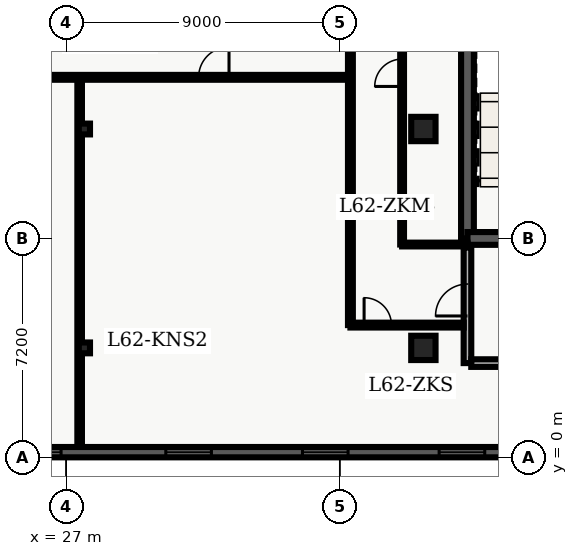
"""IFC4 building model, lengths in metres.
Left out: names, types, materials, properties, quantities, classifications, styles, units other than length and angle.
Written with IfcOpenShell. Run it as: python <this file> out.ifc"""

import sys

from ifc_helpers import new_model, entity, si_unit, converted_unit, direction, frame, origin_with_axes, origin_2d_with_axis, place, context, subcontext, project, spatial, polyline, rectangle, i_section, outline, extrude, element, fill, save


model = new_model("IFC4")
c1 = context("Model", 3, precision=1e-05, world=origin_with_axes(), true_north=direction((0.0, 1.0)))
c2 = subcontext(c1, "Body", "Model", "MODEL_VIEW")
j1 = project(units=[si_unit("LENGTHUNIT", "METRE"), converted_unit("PLANEANGLEUNIT", "DEGREE", entity("IfcPlaneAngleMeasure", 0.017), si_unit("PLANEANGLEUNIT", "RADIAN"), dimensions=[0, 0, 0, 0, 0, 0, 0])], contexts=[c1])
p1 = place(None, origin_with_axes())
s1 = spatial("IfcSite", under=j1, at=p1, CompositionType="ELEMENT")
p2 = place(p1, origin_with_axes())
s2 = spatial("IfcBuilding", under=s1, at=p2, CompositionType="ELEMENT")
p3 = place(p2, frame((0.0, 0.0, 252.9), z_axis=(0.0, 0.0, 1.0), x_axis=(1.0, 0.0, 0.0)))
s3 = spatial("IfcBuildingStorey", under=s2, at=p3, CompositionType="ELEMENT", Elevation=252.9)
p4 = place(p3, frame((40.2, 7.2, 0.0), z_axis=(0.0, 0.0, 1.0), x_axis=(0.0, 1.0, 0.0)))
e1 = element("IfcWall", 1, at=p4, inside=s3, PredefinedType="SHEAR", context=c2, shape_type="SweptSolid", body=[
    extrude(outline(polyline([(0.0, -0.21), (15.6, -0.21), (15.6, 0.21), (0.0, 0.21), (0.0, -0.21)])), origin_with_axes(), (0.0, 0.0, 1.0), 3.66),
])
p5 = place(p4, frame((12.75, 0.0, 0.0), z_axis=(0.0, 0.0, 1.0), x_axis=(1.0, 0.0, 0.0)))
e2 = element("IfcOpeningElement", 2, at=p5, cuts=e1, PredefinedType="OPENING", context=c2, shape_type="SweptSolid", body=[
    extrude(rectangle(XDim=1.2, YDim=0.44, at=origin_2d_with_axis()), origin_with_axes(), (0.0, 0.0, 1.0), 2.15),
])
p6 = place(p4, frame((9.3, 0.0, 0.0), z_axis=(0.0, 0.0, 1.0), x_axis=(1.0, 0.0, 0.0)))
e3 = element("IfcOpeningElement", 3, at=p6, cuts=e1, PredefinedType="OPENING", context=c2, shape_type="SweptSolid", body=[
    extrude(rectangle(XDim=0.9, YDim=0.44, at=origin_2d_with_axis()), origin_with_axes(), (0.0, 0.0, 1.0), 2.15),
])
p7 = place(p3, frame((40.2, 7.2, 0.0), z_axis=(0.0, 0.0, 1.0), x_axis=(1.0, 0.0, 0.0)))
e4 = element("IfcWall", 4, at=p7, inside=s3, PredefinedType="SHEAR", context=c2, shape_type="SweptSolid", body=[
    extrude(outline(polyline([(0.0, -0.21), (7.85, -0.21), (7.85, 0.21), (0.0, 0.21), (0.0, -0.21)])), origin_with_axes(), (0.0, 0.0, 1.0), 3.66),
])
p8 = place(p7, frame((2.175, 0.0, 0.0), z_axis=(0.0, 0.0, 1.0), x_axis=(1.0, 0.0, 0.0)))
e5 = element("IfcOpeningElement", 5, at=p8, cuts=e4, PredefinedType="OPENING", context=c2, shape_type="SweptSolid", body=[
    extrude(rectangle(XDim=1.05, YDim=0.44, at=origin_2d_with_axis()), origin_with_axes(), (0.0, 0.0, 1.0), 2.15),
])
p9 = place(p3, frame((40.2, 3.1, 0.0), z_axis=(0.0, 0.0, 1.0), x_axis=(0.0, 1.0, 0.0)))
e6 = element("IfcWall", 6, at=p9, inside=s3, PredefinedType="SOLIDWALL", context=c2, shape_type="SweptSolid", body=[
    extrude(outline(polyline([(0.0, -0.125), (3.8, -0.125), (3.8, 0.125), (0.0, 0.125), (0.0, -0.125)])), origin_with_axes(), (0.0, 0.0, 1.0), 2.7),
])
p10 = place(p9, frame((2.075, 0.0, 0.0), z_axis=(0.0, 0.0, 1.0), x_axis=(1.0, 0.0, 0.0)))
e7 = element("IfcOpeningElement", 7, at=p10, cuts=e6, PredefinedType="OPENING", context=c2, shape_type="SweptSolid", body=[
    extrude(rectangle(XDim=1.05, YDim=0.27, at=origin_2d_with_axis()), origin_with_axes(), (0.0, 0.0, 1.0), 2.15),
])
p11 = place(p3, frame((40.325, 3.1, 0.0), z_axis=(0.0, 0.0, 1.0), x_axis=(1.0, 0.0, 0.0)))
e8 = element("IfcWall", 8, at=p11, inside=s3, PredefinedType="SOLIDWALL", context=c2, shape_type="SweptSolid", body=[
    extrude(outline(polyline([(0.0, -0.125), (3.95, -0.125), (3.95, 0.125), (0.0, 0.125), (0.0, -0.125)])), origin_with_axes(), (0.0, 0.0, 1.0), 2.7),
])
for number, where, z_axis, x_axis in (
    (9, (27.6, 3.6, 0.0), (0.0, 0.0, 1.0), (1.0, 0.0, 0.0)),
    (10, (27.6, 10.8, 0.0), (0.0, 0.0, 1.0), (1.0, 0.0, 0.0)),
):
    element("IfcColumn", number, at=place(p3, frame(where, z_axis=z_axis, x_axis=x_axis)), inside=s3, PredefinedType="COLUMN", context=c2, shape_type="SweptSolid", body=[
        extrude(i_section(OverallWidth=0.369, OverallDepth=0.356, WebThickness=0.011, FlangeThickness=0.018, FilletRadius=0.018, at=origin_2d_with_axis()), origin_with_axes(), (0.0, 0.0, 1.0), 3.9),
    ])
for number, where, z_axis, x_axis in (
    (11, (38.75, 3.6, 0.0), (0.0, 0.0, 1.0), (1.0, 0.0, 0.0)),
    (12, (38.75, 10.8, 0.0), (0.0, 0.0, 1.0), (1.0, 0.0, 0.0)),
):
    element("IfcColumn", number, at=place(p3, frame(where, z_axis=z_axis, x_axis=x_axis)), inside=s3, PredefinedType="COLUMN", context=c2, shape_type="SweptSolid", body=[
        extrude(rectangle(XDim=0.8, YDim=0.8, at=origin_2d_with_axis()), origin_with_axes(), (0.0, 0.0, 1.0), 3.9),
    ])
p12 = place(p3, frame((20.3, 12.5, 0.0), z_axis=(0.0, 0.0, 1.0), x_axis=(1.0, 0.0, 0.0)))
e13 = element("IfcWall", 13, at=p12, inside=s3, PredefinedType="PARTITIONING", context=c2, shape_type="SweptSolid", body=[
    extrude(outline(polyline([(0.0, -0.08), (16.05, -0.08), (16.05, 0.08), (0.0, 0.08), (0.0, -0.08)])), origin_with_axes(), (0.0, 0.0, 1.0), 2.7),
])
p13 = place(p12, frame((3.662, 0.0, 0.0), z_axis=(0.0, 0.0, 1.0), x_axis=(1.0, 0.0, 0.0)))
e14 = element("IfcOpeningElement", 14, at=p13, cuts=e13, PredefinedType="OPENING", context=c2, shape_type="SweptSolid", body=[
    extrude(rectangle(XDim=1.0, YDim=0.18, at=origin_2d_with_axis()), origin_with_axes(), (0.0, 0.0, 1.0), 2.15),
])
p14 = place(p12, frame((11.557, 0.0, 0.0), z_axis=(0.0, 0.0, 1.0), x_axis=(1.0, 0.0, 0.0)))
e15 = element("IfcOpeningElement", 15, at=p14, cuts=e13, PredefinedType="OPENING", context=c2, shape_type="SweptSolid", body=[
    extrude(rectangle(XDim=1.0, YDim=0.18, at=origin_2d_with_axis()), origin_with_axes(), (0.0, 0.0, 1.0), 2.15),
])
p15 = place(p3, frame((36.35, 4.35, 0.0), z_axis=(0.0, 0.0, 1.0), x_axis=(0.0, 1.0, 0.0)))
e16 = element("IfcWall", 16, at=p15, inside=s3, PredefinedType="PARTITIONING", context=c2, shape_type="SweptSolid", body=[
    extrude(outline(polyline([(0.0, -0.08), (16.95, -0.08), (16.95, 0.08), (0.0, 0.08), (0.0, -0.08)])), origin_with_axes(), (0.0, 0.0, 1.0), 2.7),
])
p16 = place(p3, frame((27.444, 0.335, 0.0), z_axis=(0.0, 0.0, 1.0), x_axis=(0.0, 1.0, 0.0)))
e17 = element("IfcWall", 17, at=p16, inside=s3, PredefinedType="PARTITIONING", context=c2, shape_type="SweptSolid", body=[
    extrude(outline(polyline([(0.0, -0.075), (12.045, -0.075), (12.045, 0.075), (0.0, 0.075), (0.0, -0.075)])), origin_with_axes(), (0.0, 0.0, 1.0), 2.7),
])
p17 = place(p3, frame((36.35, 4.35, 0.0), z_axis=(0.0, 0.0, 1.0), x_axis=(1.0, 0.0, 0.0)))
e18 = element("IfcWall", 18, at=p17, inside=s3, PredefinedType="PARTITIONING", context=c2, shape_type="SweptSolid", body=[
    extrude(outline(polyline([(0.0, -0.08), (3.725, -0.08), (3.725, 0.08), (0.0, 0.08), (0.0, -0.08)])), origin_with_axes(), (0.0, 0.0, 1.0), 2.7),
])
p18 = place(p17, frame((0.9, 0.0, 0.0), z_axis=(0.0, 0.0, 1.0), x_axis=(1.0, 0.0, 0.0)))
e19 = element("IfcOpeningElement", 19, at=p18, cuts=e18, PredefinedType="OPENING", context=c2, shape_type="SweptSolid", body=[
    extrude(rectangle(XDim=0.9, YDim=0.18, at=origin_2d_with_axis()), origin_with_axes(), (0.0, 0.0, 1.0), 2.15),
])
p19 = place(p3, frame((38.05, 7.0, 0.0), z_axis=(0.0, 0.0, 1.0), x_axis=(1.0, 0.0, 0.0)))
e20 = element("IfcWall", 20, at=p19, inside=s3, PredefinedType="PARTITIONING", context=c2, shape_type="SweptSolid", body=[
    extrude(outline(polyline([(0.0, -0.062), (2.15, -0.062), (2.15, 0.062), (0.0, 0.062), (0.0, -0.062)])), origin_with_axes(), (0.0, 0.0, 1.0), 2.7),
])
p20 = place(p3, frame((38.05, 7.0, 0.0), z_axis=(0.0, 0.0, 1.0), x_axis=(0.0, 1.0, 0.0)))
e21 = element("IfcWall", 21, at=p20, inside=s3, PredefinedType="PARTITIONING", context=c2, shape_type="SweptSolid", body=[
    extrude(outline(polyline([(0.0, -0.062), (7.95, -0.062), (7.95, 0.062), (0.0, 0.062), (0.0, -0.062)])), origin_with_axes(), (0.0, 0.0, 1.0), 2.7),
])
p21 = place(p20, frame((5.65, 0.0, 0.0), z_axis=(0.0, 0.0, 1.0), x_axis=(1.0, 0.0, 0.0)))
e22 = element("IfcOpeningElement", 22, at=p21, cuts=e21, PredefinedType="OPENING", context=c2, shape_type="SweptSolid", body=[
    extrude(rectangle(XDim=0.9, YDim=0.145, at=origin_2d_with_axis()), origin_with_axes(), (0.0, 0.0, 1.0), 2.15),
])
p22 = place(p3, frame((47.36, 0.17, 0.0), z_axis=(0.0, 0.0, 1.0), x_axis=(-1.0, 0.0, 0.0)))
e23 = element("IfcWall", 23, at=p22, inside=s3, PredefinedType="SOLIDWALL", context=c2, shape_type="SweptSolid", body=[
    extrude(outline(polyline([(0.0, -0.17), (37.16, -0.17), (37.16, 0.17), (0.0, 0.17), (0.0, -0.17)])), origin_with_axes(), (0.0, 0.0, 1.0), 3.66),
])
p23 = place(p22, frame((2.847, 0.0, 0.45), z_axis=(0.0, 0.0, 1.0), x_axis=(1.0, 0.0, 0.0)))
e24 = element("IfcOpeningElement", 24, at=p23, cuts=e23, PredefinedType="OPENING", context=c2, shape_type="SweptSolid", body=[
    extrude(rectangle(XDim=1.5, YDim=0.36, at=origin_2d_with_axis()), origin_with_axes(), (0.0, 0.0, 1.0), 2.1),
])
p24 = place(p22, frame((7.342, 0.0, 0.45), z_axis=(0.0, 0.0, 1.0), x_axis=(1.0, 0.0, 0.0)))
e25 = element("IfcOpeningElement", 25, at=p24, cuts=e23, PredefinedType="OPENING", context=c2, shape_type="SweptSolid", body=[
    extrude(rectangle(XDim=1.5, YDim=0.36, at=origin_2d_with_axis()), origin_with_axes(), (0.0, 0.0, 1.0), 2.1),
])
p25 = place(p22, frame((11.837, 0.0, 0.45), z_axis=(0.0, 0.0, 1.0), x_axis=(1.0, 0.0, 0.0)))
e26 = element("IfcOpeningElement", 26, at=p25, cuts=e23, PredefinedType="OPENING", context=c2, shape_type="SweptSolid", body=[
    extrude(rectangle(XDim=1.5, YDim=0.36, at=origin_2d_with_axis()), origin_with_axes(), (0.0, 0.0, 1.0), 2.1),
])
p26 = place(p22, frame((16.332, 0.0, 0.45), z_axis=(0.0, 0.0, 1.0), x_axis=(1.0, 0.0, 0.0)))
e27 = element("IfcOpeningElement", 27, at=p26, cuts=e23, PredefinedType="OPENING", context=c2, shape_type="SweptSolid", body=[
    extrude(rectangle(XDim=1.5, YDim=0.36, at=origin_2d_with_axis()), origin_with_axes(), (0.0, 0.0, 1.0), 2.1),
])
p27 = place(p22, frame((21.277, 0.0, 0.45), z_axis=(0.0, 0.0, 1.0), x_axis=(1.0, 0.0, 0.0)))
e28 = element("IfcOpeningElement", 28, at=p27, cuts=e23, PredefinedType="OPENING", context=c2, shape_type="SweptSolid", body=[
    extrude(rectangle(XDim=1.5, YDim=0.36, at=origin_2d_with_axis()), origin_with_axes(), (0.0, 0.0, 1.0), 2.1),
])
p28 = place(p22, frame((25.322, 0.0, 0.45), z_axis=(0.0, 0.0, 1.0), x_axis=(1.0, 0.0, 0.0)))
e29 = element("IfcOpeningElement", 29, at=p28, cuts=e23, PredefinedType="OPENING", context=c2, shape_type="SweptSolid", body=[
    extrude(rectangle(XDim=1.5, YDim=0.36, at=origin_2d_with_axis()), origin_with_axes(), (0.0, 0.0, 1.0), 2.1),
])
p29 = place(p22, frame((29.817, 0.0, 0.45), z_axis=(0.0, 0.0, 1.0), x_axis=(1.0, 0.0, 0.0)))
e30 = element("IfcOpeningElement", 30, at=p29, cuts=e23, PredefinedType="OPENING", context=c2, shape_type="SweptSolid", body=[
    extrude(rectangle(XDim=1.5, YDim=0.36, at=origin_2d_with_axis()), origin_with_axes(), (0.0, 0.0, 1.0), 2.1),
])
p30 = place(p22, frame((34.312, 0.0, 0.45), z_axis=(0.0, 0.0, 1.0), x_axis=(1.0, 0.0, 0.0)))
e31 = element("IfcOpeningElement", 31, at=p30, cuts=e23, PredefinedType="OPENING", context=c2, shape_type="SweptSolid", body=[
    extrude(rectangle(XDim=1.5, YDim=0.36, at=origin_2d_with_axis()), origin_with_axes(), (0.0, 0.0, 1.0), 2.1),
])
p31 = place(p9, frame((2.075, 0.0, 0.0), z_axis=(0.0, 0.0, 1.0), x_axis=(1.0, 0.0, 0.0)))
e32 = element("IfcDoor", 32, at=p31, inside=s3, OperationType="SINGLE_SWING_LEFT", PredefinedType="DOOR", context=c2, shape_type="SweptSolid", body=[
    extrude(rectangle(XDim=1.05, YDim=0.09, at=origin_2d_with_axis()), origin_with_axes(), (0.0, 0.0, 1.0), 2.15),
])
fill(e7, e32)
p32 = place(p12, frame((11.557, 0.0, 0.0), z_axis=(0.0, 0.0, 1.0), x_axis=(1.0, 0.0, 0.0)))
e33 = element("IfcDoor", 33, at=p32, inside=s3, OperationType="SINGLE_SWING_RIGHT", PredefinedType="DOOR", context=c2, shape_type="SweptSolid", body=[
    extrude(rectangle(XDim=1.0, YDim=0.09, at=origin_2d_with_axis()), origin_with_axes(), (0.0, 0.0, 1.0), 2.15),
])
fill(e15, e33)
p33 = place(p17, frame((0.9, 0.0, 0.0), z_axis=(0.0, 0.0, 1.0), x_axis=(1.0, 0.0, 0.0)))
e34 = element("IfcDoor", 34, at=p33, inside=s3, OperationType="SINGLE_SWING_LEFT", PredefinedType="DOOR", context=c2, shape_type="SweptSolid", body=[
    extrude(rectangle(XDim=0.9, YDim=0.09, at=origin_2d_with_axis()), origin_with_axes(), (0.0, 0.0, 1.0), 2.15),
])
fill(e19, e34)
p34 = place(p20, frame((5.65, 0.0, 0.0), z_axis=(0.0, 0.0, 1.0), x_axis=(1.0, 0.0, 0.0)))
e35 = element("IfcDoor", 35, at=p34, inside=s3, OperationType="SINGLE_SWING_LEFT", PredefinedType="DOOR", context=c2, shape_type="SweptSolid", body=[
    extrude(rectangle(XDim=0.9, YDim=0.075, at=origin_2d_with_axis()), origin_with_axes(), (0.0, 0.0, 1.0), 2.15),
])
fill(e22, e35)
p35 = place(p22, frame((7.342, 0.0, 0.45), z_axis=(0.0, 0.0, 1.0), x_axis=(1.0, 0.0, 0.0)))
e36 = element("IfcWindow", 36, at=p35, inside=s3, PredefinedType="WINDOW", context=c2, shape_type="SweptSolid", body=[
    extrude(rectangle(XDim=1.5, YDim=0.09, at=origin_2d_with_axis()), origin_with_axes(), (0.0, 0.0, 1.0), 2.1),
])
fill(e25, e36)
p36 = place(p22, frame((11.837, 0.0, 0.45), z_axis=(0.0, 0.0, 1.0), x_axis=(1.0, 0.0, 0.0)))
e37 = element("IfcWindow", 37, at=p36, inside=s3, PredefinedType="WINDOW", context=c2, shape_type="SweptSolid", body=[
    extrude(rectangle(XDim=1.5, YDim=0.09, at=origin_2d_with_axis()), origin_with_axes(), (0.0, 0.0, 1.0), 2.1),
])
fill(e26, e37)
p37 = place(p22, frame((16.332, 0.0, 0.45), z_axis=(0.0, 0.0, 1.0), x_axis=(1.0, 0.0, 0.0)))
e38 = element("IfcWindow", 38, at=p37, inside=s3, PredefinedType="WINDOW", context=c2, shape_type="SweptSolid", body=[
    extrude(rectangle(XDim=1.5, YDim=0.09, at=origin_2d_with_axis()), origin_with_axes(), (0.0, 0.0, 1.0), 2.1),
])
fill(e27, e38)
p38 = place(p22, frame((21.277, 0.0, 0.45), z_axis=(0.0, 0.0, 1.0), x_axis=(1.0, 0.0, 0.0)))
e39 = element("IfcWindow", 39, at=p38, inside=s3, PredefinedType="WINDOW", context=c2, shape_type="SweptSolid", body=[
    extrude(rectangle(XDim=1.5, YDim=0.09, at=origin_2d_with_axis()), origin_with_axes(), (0.0, 0.0, 1.0), 2.1),
])
fill(e28, e39)
save(model, sys.argv[1])
